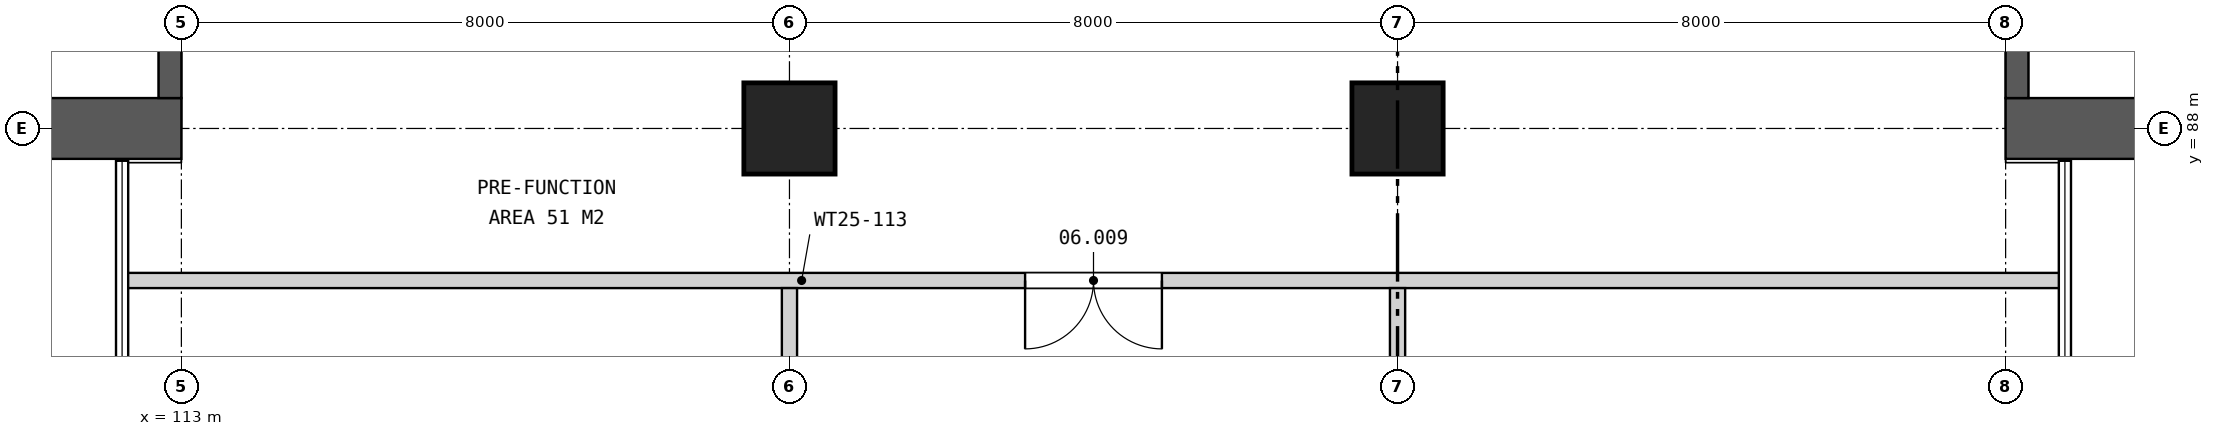
"""IFC4 building model, lengths in metres.
Left out: names, types, materials, properties, quantities, classifications, styles, units other than length and angle.
Written with IfcOpenShell. Run it as: python <this file> out.ifc"""

import sys

from ifc_helpers import new_model, si_unit, direction, frame, frame_2d, origin, origin_2d, place, context, subcontext, project, spatial, rectangle, extrude, element, fill, save


model = new_model("IFC4")
c1 = context("Model", 3, precision=1e-05, world=origin(), true_north=direction((0.0, 1.0)))
c2 = subcontext(c1, "Body", "Model", "MODEL_VIEW")
j1 = project(units=[si_unit("LENGTHUNIT", "METRE"), si_unit("PLANEANGLEUNIT", "RADIAN")], contexts=[c1])
p1 = place(None, origin())
s1 = spatial("IfcSite", under=j1, at=p1, CompositionType="ELEMENT")
p2 = place(p1, origin())
s2 = spatial("IfcBuilding", under=s1, at=p2, CompositionType="ELEMENT")
p3 = place(p2, frame((0.0, 0.0, 47.5)))
s3 = spatial("IfcBuildingStorey", under=s2, at=p3, CompositionType="ELEMENT", Elevation=47.5)
for number, where, z_axis, x_axis in (
    (1, (121.0, 88.0, 0.0), (0.0, 0.0, 1.0), (1.0, 0.0, 0.0)),
    (2, (129.0, 88.0, 0.0), (0.0, 0.0, 1.0), (1.0, 0.0, 0.0)),
):
    element("IfcColumn", number, at=place(p3, frame(where, z_axis=z_axis, x_axis=x_axis)), inside=s3, PredefinedType="COLUMN", context=c2, shape_type="SweptSolid", body=[
        extrude(rectangle(XDim=1.2, YDim=1.2, at=origin_2d()), origin(), (0.0, 0.0, 1.0), 6.0),
    ])
p4 = place(p3, frame((137.0, 88.0, 0.0), z_axis=(0.0, 0.0, 1.0), x_axis=(1.0, 0.0, 0.0)))
e3 = element("IfcWall", 3, at=p4, inside=s3, PredefinedType="SHEAR", context=c2, shape_type="SweptSolid", body=[
    extrude(rectangle(XDim=7.1, YDim=0.8, at=frame_2d((3.55, 0.0))), origin(), (0.0, 0.0, 1.0), 6.0),
])
p5 = place(p3, frame((137.15, 88.4, 0.0), z_axis=(0.0, 0.0, 1.0), x_axis=(0.0, 1.0, 0.0)))
e4 = element("IfcWall", 4, at=p5, inside=s3, PredefinedType="SHEAR", context=c2, shape_type="SweptSolid", body=[
    extrude(rectangle(XDim=5.9, YDim=0.3, at=frame_2d((2.95, 0.0))), origin(), (0.0, 0.0, 1.0), 6.0),
])
p6 = place(p3, frame((113.0, 88.0, 0.0), z_axis=(0.0, 0.0, 1.0), x_axis=(-1.0, 0.0, 0.0)))
e5 = element("IfcWall", 5, at=p6, inside=s3, PredefinedType="SHEAR", context=c2, shape_type="SweptSolid", body=[
    extrude(rectangle(XDim=7.1, YDim=0.8, at=frame_2d((3.55, 0.0))), origin(), (0.0, 0.0, 1.0), 6.0),
])
p7 = place(p3, frame((112.85, 94.3, 0.0), z_axis=(0.0, 0.0, 1.0), x_axis=(0.0, -1.0, 0.0)))
e6 = element("IfcWall", 6, at=p7, inside=s3, PredefinedType="SHEAR", context=c2, shape_type="SweptSolid", body=[
    extrude(rectangle(XDim=5.9, YDim=0.3, at=frame_2d((2.95, 0.0))), origin(), (0.0, 0.0, 1.0), 6.0),
])
p8 = place(p3, frame((112.2, 86.0, 0.0), z_axis=(0.0, 0.0, 1.0), x_axis=(1.0, 0.0, 0.0)))
e7 = element("IfcWall", 7, at=p8, inside=s3, PredefinedType="PARTITIONING", context=c2, shape_type="SweptSolid", body=[
    extrude(rectangle(XDim=25.6, YDim=0.2, at=frame_2d((12.8, 0.0))), origin(), (0.0, 0.0, 1.0), 5.26),
])
p9 = place(p8, frame((11.9, 0.0, 0.0)))
e8 = element("IfcOpeningElement", 8, at=p9, cuts=e7, PredefinedType="OPENING", context=c2, shape_type="SweptSolid", body=[
    extrude(rectangle(XDim=1.8, YDim=2.4, at=frame_2d((0.9, 1.2))), frame((0.0, 0.11, 0.0), z_axis=(0.0, -1.0, 0.0), x_axis=(1.0, 0.0, 0.0)), (0.0, 0.0, 1.0), 0.22),
])
p10 = place(p3, frame((121.0, 80.0, 0.0), z_axis=(0.0, 0.0, 1.0), x_axis=(0.0, 1.0, 0.0)))
e9 = element("IfcWall", 9, at=p10, inside=s3, PredefinedType="PARTITIONING", context=c2, shape_type="SweptSolid", body=[
    extrude(rectangle(XDim=5.9, YDim=0.2, at=frame_2d((2.95, 0.0))), origin(), (0.0, 0.0, 1.0), 2.7),
])
p11 = place(p10, frame((2.5, 0.0, 0.0)))
e10 = element("IfcOpeningElement", 10, at=p11, cuts=e9, PredefinedType="OPENING", context=c2, shape_type="SweptSolid", body=[
    extrude(rectangle(XDim=1.0, YDim=2.1, at=frame_2d((0.5, 1.05))), frame((0.0, 0.11, 0.0), z_axis=(0.0, -1.0, 0.0), x_axis=(1.0, 0.0, 0.0)), (0.0, 0.0, 1.0), 0.22),
])
p12 = place(p3, frame((129.0, 80.0, 0.0), z_axis=(0.0, 0.0, 1.0), x_axis=(0.0, 1.0, 0.0)))
e11 = element("IfcWall", 11, at=p12, inside=s3, PredefinedType="PARTITIONING", context=c2, shape_type="SweptSolid", body=[
    extrude(rectangle(XDim=5.9, YDim=0.2, at=frame_2d((2.95, 0.0))), origin(), (0.0, 0.0, 1.0), 2.7),
])
p13 = place(p12, frame((2.5, 0.0, 0.0)))
e12 = element("IfcOpeningElement", 12, at=p13, cuts=e11, PredefinedType="OPENING", context=c2, shape_type="SweptSolid", body=[
    extrude(rectangle(XDim=1.0, YDim=2.1, at=frame_2d((0.5, 1.05))), frame((0.0, 0.11, 0.0), z_axis=(0.0, -1.0, 0.0), x_axis=(1.0, 0.0, 0.0)), (0.0, 0.0, 1.0), 0.22),
])
p14 = place(p9, frame((1.8, 0.0, 0.0), z_axis=(0.0, 0.0, 1.0), x_axis=(-1.0, 0.0, 0.0)))
e13 = element("IfcDoor", 13, at=p14, inside=s3, OperationType="DOUBLE_DOOR_SINGLE_SWING", PredefinedType="DOOR", context=c2, shape_type="SweptSolid", body=[
    extrude(rectangle(XDim=1.8, YDim=2.4, at=frame_2d((0.9, 1.2))), frame((0.0, 0.025, 0.0), z_axis=(0.0, -1.0, 0.0), x_axis=(1.0, 0.0, 0.0)), (0.0, 0.0, 1.0), 0.05),
])
fill(e8, e13)
save(model, sys.argv[1])
